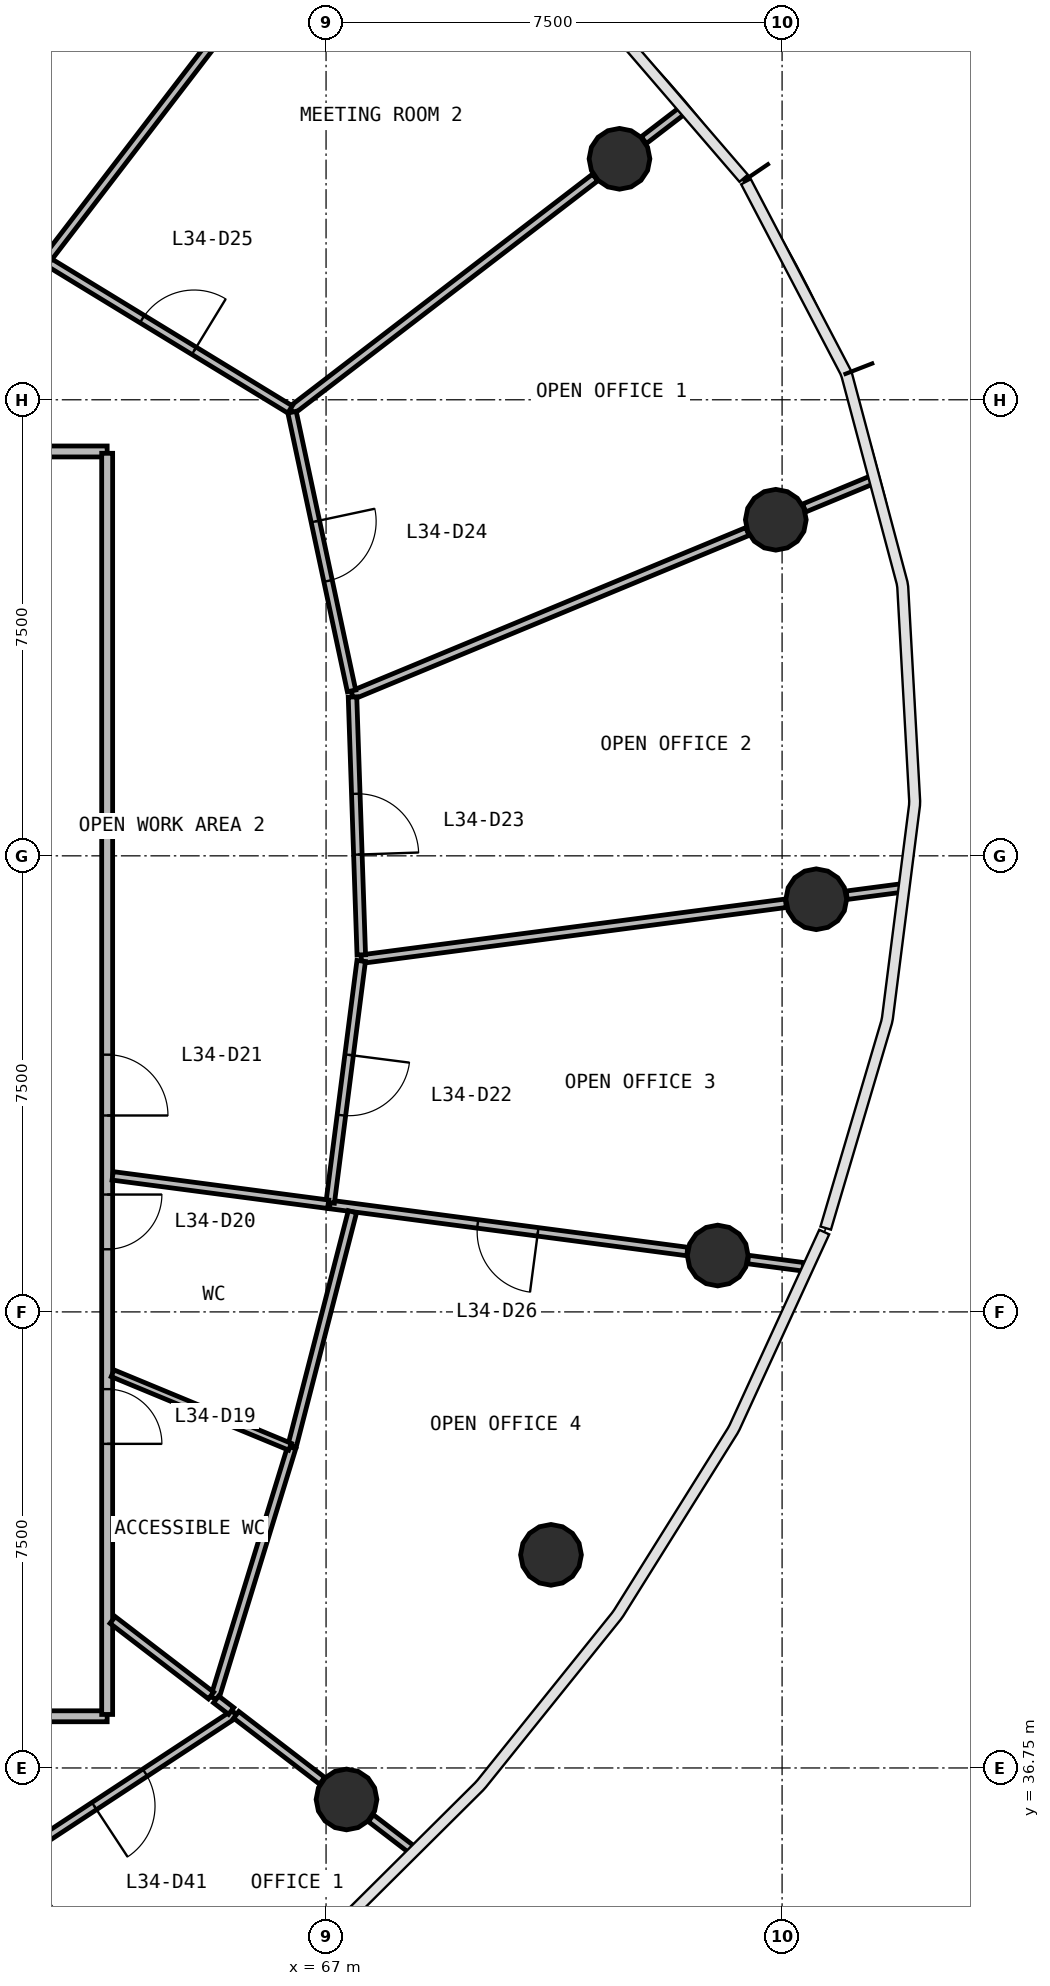
"""IFC4 building model, lengths in metres.
Left out: names, types, materials, properties, quantities, classifications, styles, units other than length and angle.
Written with IfcOpenShell. Run it as: python <this file> out.ifc"""

import sys

from ifc_helpers import new_model, si_unit, direction, frame, frame_2d, origin, origin_2d, place, context, subcontext, project, spatial, rectangle, circle, extrude, source, transform, mapped, element, fill, save


model = new_model("IFC4")
c1 = context("Model", 3, precision=1e-05, world=origin(), true_north=direction((0.0, 1.0)))
c2 = subcontext(c1, "Body", "Model", "MODEL_VIEW")
j1 = project(units=[si_unit("LENGTHUNIT", "METRE"), si_unit("PLANEANGLEUNIT", "RADIAN")], contexts=[c1])
p1 = place(None, origin())
s1 = spatial("IfcSite", under=j1, at=p1, CompositionType="ELEMENT")
p2 = place(p1, origin())
s2 = spatial("IfcBuilding", under=s1, at=p2, CompositionType="ELEMENT")
p3 = place(p2, frame((0.0, 0.0, 144.8)))
s3 = spatial("IfcBuildingStorey", under=s2, at=p3, CompositionType="ELEMENT", Elevation=144.8)
m1 = source(origin(), c2, "Body", "SweptSolid", [
    extrude(circle(Radius=0.5, at=origin_2d()), origin(), (0.0, 0.0, 1.0), 3.9),
])
for number, where, z_axis, x_axis in (
    (1, (75.062, 51.036, 0.0), (0.0, 0.0, 1.0), (1.0, 0.0, 0.0)),
    (2, (74.397, 57.277, 0.0), (0.0, 0.0, 1.0), (1.0, 0.0, 0.0)),
    (3, (71.826, 63.213, 0.0), (0.0, 0.0, 1.0), (1.0, 0.0, 0.0)),
    (4, (67.336, 36.232, 0.0), (0.0, 0.0, 1.0), (1.0, 0.0, 0.0)),
    (5, (70.699, 40.254, 0.0), (0.0, 0.0, 1.0), (1.0, 0.0, 0.0)),
    (6, (73.441, 45.177, 0.0), (0.0, 0.0, 1.0), (1.0, 0.0, 0.0)),
):
    element("IfcColumn", number, at=place(p3, frame(where, z_axis=z_axis, x_axis=x_axis)), inside=s3, PredefinedType="COLUMN", context=c2, shape_type="MappedRepresentation", body=[
        mapped(m1, transform((0.0, 0.0, 0.0), scale=1.0)),
    ])
p4 = place(p3, frame((40.6, 58.4, 0.0), z_axis=(0.0, 0.0, 1.0), x_axis=(1.0, 0.0, 0.0)))
e7 = element("IfcWall", 7, at=p4, inside=s3, PredefinedType="PARTITIONING", context=c2, shape_type="SweptSolid", body=[
    extrude(rectangle(XDim=22.8, YDim=0.18, at=frame_2d((11.4, 0.0))), origin(), (0.0, 0.0, 1.0), 2.88),
])
p5 = place(p4, frame((12.95, 0.0, 0.0)))
e8 = element("IfcOpeningElement", 8, at=p5, cuts=e7, PredefinedType="OPENING", context=c2, shape_type="SweptSolid", body=[
    extrude(rectangle(XDim=1.0, YDim=2.1, at=frame_2d((0.5, 1.05))), frame((0.0, 0.1, 0.0), z_axis=(0.0, -1.0, 0.0), x_axis=(1.0, 0.0, 0.0)), (0.0, 0.0, 1.0), 0.2),
])
p6 = place(p4, frame((10.95, 0.0, 0.0)))
e9 = element("IfcOpeningElement", 9, at=p6, cuts=e7, PredefinedType="OPENING", context=c2, shape_type="SweptSolid", body=[
    extrude(rectangle(XDim=1.0, YDim=2.1, at=frame_2d((0.5, 1.05))), frame((0.0, 0.1, 0.0), z_axis=(0.0, -1.0, 0.0), x_axis=(1.0, 0.0, 0.0)), (0.0, 0.0, 1.0), 0.2),
])
p7 = place(p4, frame((8.75, 0.0, 0.0)))
e10 = element("IfcOpeningElement", 10, at=p7, cuts=e7, PredefinedType="OPENING", context=c2, shape_type="SweptSolid", body=[
    extrude(rectangle(XDim=1.0, YDim=2.1, at=frame_2d((0.5, 1.05))), frame((0.0, 0.1, 0.0), z_axis=(0.0, -1.0, 0.0), x_axis=(1.0, 0.0, 0.0)), (0.0, 0.0, 1.0), 0.2),
])
p8 = place(p3, frame((63.4, 37.6, 0.0), z_axis=(0.0, 0.0, 1.0), x_axis=(-1.0, 0.0, 0.0)))
e11 = element("IfcWall", 11, at=p8, inside=s3, PredefinedType="PARTITIONING", context=c2, shape_type="SweptSolid", body=[
    extrude(rectangle(XDim=22.8, YDim=0.18, at=frame_2d((11.4, 0.0))), origin(), (0.0, 0.0, 1.0), 2.88),
])
p9 = place(p8, frame((12.95, 0.0, 0.0)))
e12 = element("IfcOpeningElement", 12, at=p9, cuts=e11, PredefinedType="OPENING", context=c2, shape_type="SweptSolid", body=[
    extrude(rectangle(XDim=1.0, YDim=2.1, at=frame_2d((0.5, 1.05))), frame((0.0, 0.1, 0.0), z_axis=(0.0, -1.0, 0.0), x_axis=(1.0, 0.0, 0.0)), (0.0, 0.0, 1.0), 0.2),
])
p10 = place(p8, frame((10.95, 0.0, 0.0)))
e13 = element("IfcOpeningElement", 13, at=p10, cuts=e11, PredefinedType="OPENING", context=c2, shape_type="SweptSolid", body=[
    extrude(rectangle(XDim=1.0, YDim=2.1, at=frame_2d((0.5, 1.05))), frame((0.0, 0.1, 0.0), z_axis=(0.0, -1.0, 0.0), x_axis=(1.0, 0.0, 0.0)), (0.0, 0.0, 1.0), 0.2),
])
p11 = place(p3, frame((63.4, 58.37, 0.0), z_axis=(0.0, 0.0, 1.0), x_axis=(0.0, -1.0, 0.0)))
e14 = element("IfcWall", 14, at=p11, inside=s3, PredefinedType="PARTITIONING", context=c2, shape_type="SweptSolid", body=[
    extrude(rectangle(XDim=20.74, YDim=0.18, at=frame_2d((10.37, 0.0))), origin(), (0.0, 0.0, 1.0), 2.88),
])
p12 = place(p11, frame((15.39, 0.0, 0.0)))
e15 = element("IfcOpeningElement", 15, at=p12, cuts=e14, PredefinedType="OPENING", context=c2, shape_type="SweptSolid", body=[
    extrude(rectangle(XDim=0.9, YDim=2.1, at=frame_2d((0.45, 1.05))), frame((0.0, 0.1, 0.0), z_axis=(0.0, -1.0, 0.0), x_axis=(1.0, 0.0, 0.0)), (0.0, 0.0, 1.0), 0.2),
])
p13 = place(p11, frame((12.19, 0.0, 0.0)))
e16 = element("IfcOpeningElement", 16, at=p13, cuts=e14, PredefinedType="OPENING", context=c2, shape_type="SweptSolid", body=[
    extrude(rectangle(XDim=0.9, YDim=2.1, at=frame_2d((0.45, 1.05))), frame((0.0, 0.1, 0.0), z_axis=(0.0, -1.0, 0.0), x_axis=(1.0, 0.0, 0.0)), (0.0, 0.0, 1.0), 0.2),
])
p14 = place(p11, frame((9.89, 0.0, 0.0)))
e17 = element("IfcOpeningElement", 17, at=p14, cuts=e14, PredefinedType="OPENING", context=c2, shape_type="SweptSolid", body=[
    extrude(rectangle(XDim=1.0, YDim=2.1, at=frame_2d((0.5, 1.05))), frame((0.0, 0.1, 0.0), z_axis=(0.0, -1.0, 0.0), x_axis=(1.0, 0.0, 0.0)), (0.0, 0.0, 1.0), 0.2),
])
p15 = place(p3, frame((67.582, 50.052, 0.0), z_axis=(0.0, 0.0, 1.0), x_axis=(0.991449691786, 0.130489496352, 0.0)))
e18 = element("IfcWall", 18, at=p15, inside=s3, PredefinedType="PARTITIONING", context=c2, shape_type="SweptSolid", body=[
    extrude(rectangle(XDim=7.041, YDim=0.14, at=frame_2d((3.52, 0.0))), origin(), (0.0, 0.0, 1.0), 2.88),
])
p16 = place(p3, frame((67.434, 54.393, 0.0), z_axis=(0.0, 0.0, 1.0), x_axis=(0.923882268554, 0.382676826907, 0.0)))
e19 = element("IfcWall", 19, at=p16, inside=s3, PredefinedType="PARTITIONING", context=c2, shape_type="SweptSolid", body=[
    extrude(rectangle(XDim=7.032, YDim=0.14, at=frame_2d((3.516, 0.0))), origin(), (0.0, 0.0, 1.0), 2.88),
])
p17 = place(p3, frame((62.392, 61.543, 0.0), z_axis=(0.0, 0.0, 1.0), x_axis=(0.608777226721, 0.793341218031, 0.0)))
e20 = element("IfcWall", 20, at=p17, inside=s3, PredefinedType="PARTITIONING", context=c2, shape_type="SweptSolid", body=[
    extrude(rectangle(XDim=6.449, YDim=0.14, at=frame_2d((3.224, 0.0))), origin(), (0.0, 0.0, 1.0), 2.88),
])
p18 = place(p3, frame((66.434, 59.075, 0.0), z_axis=(0.0, 0.0, 1.0), x_axis=(0.793363364339, 0.608748365193, 0.0)))
e21 = element("IfcWall", 21, at=p18, inside=s3, PredefinedType="PARTITIONING", context=c2, shape_type="SweptSolid", body=[
    extrude(rectangle(XDim=6.292, YDim=0.14, at=frame_2d((3.146, 0.0))), origin(), (0.0, 0.0, 1.0), 2.88),
])
p19 = place(p3, frame((72.941, 45.243, 0.0), z_axis=(0.0, 0.0, 1.0), x_axis=(-0.991450229477, 0.13048541095, 0.0)))
e22 = element("IfcWall", 22, at=p19, inside=s3, PredefinedType="PARTITIONING", context=c2, shape_type="SweptSolid", body=[
    extrude(rectangle(XDim=5.927, YDim=0.14, at=frame_2d((2.964, 0.0))), origin(), (0.0, 0.0, 1.0), 2.88),
])
p20 = place(p19, frame((2.477, 0.0, 0.0)))
e23 = element("IfcOpeningElement", 23, at=p20, cuts=e22, PredefinedType="OPENING", context=c2, shape_type="SweptSolid", body=[
    extrude(rectangle(XDim=1.0, YDim=2.1, at=frame_2d((0.5, 1.05))), frame((0.0, 0.08, 0.0), z_axis=(0.0, -1.0, 0.0), x_axis=(1.0, 0.0, 0.0)), (0.0, 0.0, 1.0), 0.16),
])
p21 = place(p3, frame((66.44, 59.046, 0.0), z_axis=(0.0, 0.0, 1.0), x_axis=(0.208821144004, -0.977953848511, 0.0)))
e24 = element("IfcWall", 24, at=p21, inside=s3, PredefinedType="PARTITIONING", context=c2, shape_type="SweptSolid", body=[
    extrude(rectangle(XDim=4.687, YDim=0.14, at=frame_2d((2.344, 0.0))), origin(), (0.0, 0.0, 1.0), 2.88),
])
p22 = place(p21, frame((1.837, 0.0, 0.0)))
e25 = element("IfcOpeningElement", 25, at=p22, cuts=e24, PredefinedType="OPENING", context=c2, shape_type="SweptSolid", body=[
    extrude(rectangle(XDim=1.0, YDim=2.1, at=frame_2d((0.5, 1.05))), frame((0.0, 0.08, 0.0), z_axis=(0.0, -1.0, 0.0), x_axis=(1.0, 0.0, 0.0)), (0.0, 0.0, 1.0), 0.16),
])
p23 = place(p3, frame((62.452, 61.507, 0.0), z_axis=(0.0, 0.0, 1.0), x_axis=(0.853479672846, -0.521126134481, 0.0)))
e26 = element("IfcWall", 26, at=p23, inside=s3, PredefinedType="PARTITIONING", context=c2, shape_type="SweptSolid", body=[
    extrude(rectangle(XDim=4.635, YDim=0.14, at=frame_2d((2.318, 0.0))), origin(), (0.0, 0.0, 1.0), 2.88),
])
p24 = place(p23, frame((1.785, 0.0, 0.0)))
e27 = element("IfcOpeningElement", 27, at=p24, cuts=e26, PredefinedType="OPENING", context=c2, shape_type="SweptSolid", body=[
    extrude(rectangle(XDim=1.0, YDim=2.1, at=frame_2d((0.5, 1.05))), frame((0.0, 0.08, 0.0), z_axis=(0.0, -1.0, 0.0), x_axis=(1.0, 0.0, 0.0)), (0.0, 0.0, 1.0), 0.16),
])
p25 = place(p3, frame((65.499, 37.642, 0.0), z_axis=(0.0, 0.0, 1.0), x_axis=(-0.835791023709, -0.549047688901, 0.0)))
e28 = element("IfcWall", 28, at=p25, inside=s3, PredefinedType="PARTITIONING", context=c2, shape_type="SweptSolid", body=[
    extrude(rectangle(XDim=4.416, YDim=0.14, at=frame_2d((2.208, 0.0))), origin(), (0.0, 0.0, 1.0), 2.88),
])
p26 = place(p25, frame((1.765, 0.0, 0.0)))
e29 = element("IfcOpeningElement", 29, at=p26, cuts=e28, PredefinedType="OPENING", context=c2, shape_type="SweptSolid", body=[
    extrude(rectangle(XDim=1.0, YDim=2.1, at=frame_2d((0.5, 1.05))), frame((0.0, 0.08, 0.0), z_axis=(0.0, -1.0, 0.0), x_axis=(1.0, 0.0, 0.0)), (0.0, 0.0, 1.0), 0.16),
])
p27 = place(p3, frame((67.435, 54.363, 0.0), z_axis=(0.0, 0.0, 1.0), x_axis=(0.034058056345, -0.999419856116, 0.0)))
e30 = element("IfcWall", 30, at=p27, inside=s3, PredefinedType="PARTITIONING", context=c2, shape_type="SweptSolid", body=[
    extrude(rectangle(XDim=4.244, YDim=0.14, at=frame_2d((2.122, 0.0))), origin(), (0.0, 0.0, 1.0), 2.88),
])
p28 = place(p27, frame((1.594, 0.0, 0.0)))
e31 = element("IfcOpeningElement", 31, at=p28, cuts=e30, PredefinedType="OPENING", context=c2, shape_type="SweptSolid", body=[
    extrude(rectangle(XDim=1.0, YDim=2.1, at=frame_2d((0.5, 1.05))), frame((0.0, 0.08, 0.0), z_axis=(0.0, -1.0, 0.0), x_axis=(1.0, 0.0, 0.0)), (0.0, 0.0, 1.0), 0.16),
])
p29 = place(p3, frame((65.168, 37.896, 0.0), z_axis=(0.0, 0.0, 1.0), x_axis=(0.29375186903, 0.95588170787, 0.0)))
e32 = element("IfcWall", 32, at=p29, inside=s3, PredefinedType="PARTITIONING", context=c2, shape_type="SweptSolid", body=[
    extrude(rectangle(XDim=4.315, YDim=0.14, at=frame_2d((2.158, 0.0))), origin(), (0.0, 0.0, 1.0), 2.88),
])
p30 = place(p3, frame((66.443, 42.05, 0.0), z_axis=(0.0, 0.0, 1.0), x_axis=(0.249469158669, 0.968382743998, 0.0)))
e33 = element("IfcWall", 33, at=p30, inside=s3, PredefinedType="PARTITIONING", context=c2, shape_type="SweptSolid", body=[
    extrude(rectangle(XDim=3.973, YDim=0.14, at=frame_2d((1.987, 0.0))), origin(), (0.0, 0.0, 1.0), 2.88),
])
p31 = place(p3, frame((67.578, 50.021, 0.0), z_axis=(0.0, 0.0, 1.0), x_axis=(-0.127198124576, -0.991877329666, 0.0)))
e34 = element("IfcWall", 34, at=p31, inside=s3, PredefinedType="PARTITIONING", context=c2, shape_type="SweptSolid", body=[
    extrude(rectangle(XDim=4.008, YDim=0.14, at=frame_2d((2.004, 0.0))), origin(), (0.0, 0.0, 1.0), 2.88),
])
p32 = place(p31, frame((1.558, 0.0, 0.0)))
e35 = element("IfcOpeningElement", 35, at=p32, cuts=e34, PredefinedType="OPENING", context=c2, shape_type="SweptSolid", body=[
    extrude(rectangle(XDim=1.0, YDim=2.1, at=frame_2d((0.5, 1.05))), frame((0.0, 0.08, 0.0), z_axis=(0.0, -1.0, 0.0), x_axis=(1.0, 0.0, 0.0)), (0.0, 0.0, 1.0), 0.16),
])
p33 = place(p3, frame((63.49, 46.487, 0.0), z_axis=(0.0, 0.0, 1.0), x_axis=(0.991447785983, -0.130503975686, 0.0)))
e36 = element("IfcWall", 36, at=p33, inside=s3, PredefinedType="PARTITIONING", context=c2, shape_type="SweptSolid", body=[
    extrude(rectangle(XDim=3.575, YDim=0.14, at=frame_2d((1.788, 0.0))), origin(), (0.0, 0.0, 1.0), 2.88),
])
p34 = place(p3, frame((65.192, 37.878, 0.0), z_axis=(0.0, 0.0, 1.0), x_axis=(0.793204085438, -0.608955892364, 0.0)))
e37 = element("IfcWall", 37, at=p34, inside=s3, PredefinedType="PARTITIONING", context=c2, shape_type="SweptSolid", body=[
    extrude(rectangle(XDim=0.313, YDim=0.14, at=frame_2d((0.156, 0.0))), origin(), (0.0, 0.0, 1.0), 2.88),
])
p35 = place(p3, frame((63.49, 39.183, 0.0), z_axis=(0.0, 0.0, 1.0), x_axis=(0.793375181689, -0.608732963688, 0.0)))
e38 = element("IfcWall", 38, at=p35, inside=s3, PredefinedType="PARTITIONING", context=c2, shape_type="SweptSolid", body=[
    extrude(rectangle(XDim=2.04, YDim=0.14, at=frame_2d((1.02, 0.0))), origin(), (0.0, 0.0, 1.0), 2.88),
])
p36 = place(p3, frame((61.851, 35.162, 0.0), z_axis=(0.0, 0.0, 1.0), x_axis=(0.608663396488, -0.793428553668, 0.0)))
e39 = element("IfcWall", 39, at=p36, inside=s3, PredefinedType="PARTITIONING", context=c2, shape_type="SweptSolid", body=[
    extrude(rectangle(XDim=2.277, YDim=0.14, at=frame_2d((1.138, 0.0))), origin(), (0.0, 0.0, 1.0), 2.88),
])
p37 = place(p3, frame((66.936, 36.539, 0.0), z_axis=(0.0, 0.0, 1.0), x_axis=(-0.793392416666, 0.608710500301, 0.0)))
e40 = element("IfcWall", 40, at=p37, inside=s3, PredefinedType="PARTITIONING", context=c2, shape_type="SweptSolid", body=[
    extrude(rectangle(XDim=1.782, YDim=0.14, at=frame_2d((0.891, 0.0))), origin(), (0.0, 0.0, 1.0), 2.88),
])
p38 = place(p3, frame((74.863, 57.47, 0.0), z_axis=(0.0, 0.0, 1.0), x_axis=(0.923857958789, 0.382735511786, 0.0)))
e41 = element("IfcWall", 41, at=p38, inside=s3, PredefinedType="PARTITIONING", context=c2, shape_type="SweptSolid", body=[
    extrude(rectangle(XDim=1.236, YDim=0.14, at=frame_2d((0.618, 0.0))), origin(), (0.0, 0.0, 1.0), 2.88),
])
p39 = place(p3, frame((73.941, 45.111, 0.0), z_axis=(0.0, 0.0, 1.0), x_axis=(0.991463350104, -0.130385679429, 0.0)))
e42 = element("IfcWall", 42, at=p39, inside=s3, PredefinedType="PARTITIONING", context=c2, shape_type="SweptSolid", body=[
    extrude(rectangle(XDim=0.917, YDim=0.14, at=frame_2d((0.459, 0.0))), origin(), (0.0, 0.0, 1.0), 2.88),
])
p40 = place(p3, frame((75.562, 51.102, 0.0), z_axis=(0.0, 0.0, 1.0), x_axis=(0.991464295553, 0.130378489957, 0.0)))
e43 = element("IfcWall", 43, at=p40, inside=s3, PredefinedType="PARTITIONING", context=c2, shape_type="SweptSolid", body=[
    extrude(rectangle(XDim=0.914, YDim=0.14, at=frame_2d((0.457, 0.0))), origin(), (0.0, 0.0, 1.0), 2.88),
])
p41 = place(p3, frame((67.737, 35.925, 0.0), z_axis=(0.0, 0.0, 1.0), x_axis=(0.793365367908, -0.608745753992, 0.0)))
e44 = element("IfcWall", 44, at=p41, inside=s3, PredefinedType="PARTITIONING", context=c2, shape_type="SweptSolid", body=[
    extrude(rectangle(XDim=0.832, YDim=0.14, at=frame_2d((0.416, 0.0))), origin(), (0.0, 0.0, 1.0), 2.88),
])
p42 = place(p3, frame((72.226, 63.52, 0.0), z_axis=(0.0, 0.0, 1.0), x_axis=(0.793349194644, 0.608766831684, 0.0)))
e45 = element("IfcWall", 45, at=p42, inside=s3, PredefinedType="PARTITIONING", context=c2, shape_type="SweptSolid", body=[
    extrude(rectangle(XDim=0.825, YDim=0.14, at=frame_2d((0.413, 0.0))), origin(), (0.0, 0.0, 1.0), 2.88),
])
p43 = place(p3, frame((63.49, 43.241, 0.0), z_axis=(0.0, 0.0, 1.0), x_axis=(0.923875488976, -0.382693194178, 0.0)))
e46 = element("IfcWall", 46, at=p43, inside=s3, PredefinedType="PARTITIONING", context=c2, shape_type="SweptSolid", body=[
    extrude(rectangle(XDim=3.158, YDim=0.12, at=frame_2d((1.579, 0.0))), origin(), (0.0, 0.0, 1.0), 2.88),
])
m2 = source(origin(), c2, "Body", "SweptSolid", [
    extrude(rectangle(XDim=0.9, YDim=2.1, at=frame_2d((0.45, 1.05))), frame((0.0, 0.025, 0.0), z_axis=(0.0, -1.0, 0.0), x_axis=(1.0, 0.0, 0.0)), (0.0, 0.0, 1.0), 0.05),
])
p44 = place(p12, origin())
e47 = element("IfcDoor", 47, at=p44, inside=s3, OperationType="SINGLE_SWING_RIGHT", PredefinedType="DOOR", context=c2, shape_type="MappedRepresentation", body=[
    mapped(m2, transform((0.0, 0.0, 0.0), scale=1.0)),
])
fill(e15, e47)
p45 = place(p13, origin())
e48 = element("IfcDoor", 48, at=p45, inside=s3, OperationType="SINGLE_SWING_LEFT", PredefinedType="DOOR", context=c2, shape_type="MappedRepresentation", body=[
    mapped(m2, transform((0.0, 0.0, 0.0), scale=1.0)),
])
fill(e16, e48)
m3 = source(origin(), c2, "Body", "SweptSolid", [
    extrude(rectangle(XDim=1.0, YDim=2.1, at=frame_2d((0.5, 1.05))), frame((0.0, 0.025, 0.0), z_axis=(0.0, -1.0, 0.0), x_axis=(1.0, 0.0, 0.0)), (0.0, 0.0, 1.0), 0.05),
])
p46 = place(p14, origin())
e49 = element("IfcDoor", 49, at=p46, inside=s3, OperationType="SINGLE_SWING_RIGHT", PredefinedType="DOOR", context=c2, shape_type="MappedRepresentation", body=[
    mapped(m3, transform((0.0, 0.0, 0.0), scale=1.0)),
])
fill(e17, e49)
p47 = place(p32, origin())
e50 = element("IfcDoor", 50, at=p47, inside=s3, OperationType="SINGLE_SWING_LEFT", PredefinedType="DOOR", context=c2, shape_type="MappedRepresentation", body=[
    mapped(m3, transform((0.0, 0.0, 0.0), scale=1.0)),
])
fill(e35, e50)
p48 = place(p28, origin())
e51 = element("IfcDoor", 51, at=p48, inside=s3, OperationType="SINGLE_SWING_RIGHT", PredefinedType="DOOR", context=c2, shape_type="MappedRepresentation", body=[
    mapped(m3, transform((0.0, 0.0, 0.0), scale=1.0)),
])
fill(e31, e51)
p49 = place(p22, origin())
e52 = element("IfcDoor", 52, at=p49, inside=s3, OperationType="SINGLE_SWING_LEFT", PredefinedType="DOOR", context=c2, shape_type="MappedRepresentation", body=[
    mapped(m3, transform((0.0, 0.0, 0.0), scale=1.0)),
])
fill(e25, e52)
p50 = place(p24, origin())
e53 = element("IfcDoor", 53, at=p50, inside=s3, OperationType="SINGLE_SWING_RIGHT", PredefinedType="DOOR", context=c2, shape_type="MappedRepresentation", body=[
    mapped(m3, transform((0.0, 0.0, 0.0), scale=1.0)),
])
fill(e27, e53)
p51 = place(p20, origin())
e54 = element("IfcDoor", 54, at=p51, inside=s3, OperationType="SINGLE_SWING_LEFT", PredefinedType="DOOR", context=c2, shape_type="MappedRepresentation", body=[
    mapped(m3, transform((0.0, 0.0, 0.0), scale=1.0)),
])
fill(e23, e54)
p52 = place(p26, origin())
e55 = element("IfcDoor", 55, at=p52, inside=s3, OperationType="SINGLE_SWING_RIGHT", PredefinedType="DOOR", context=c2, shape_type="MappedRepresentation", body=[
    mapped(m3, transform((0.0, 0.0, 0.0), scale=1.0)),
])
fill(e29, e55)
save(model, sys.argv[1])
